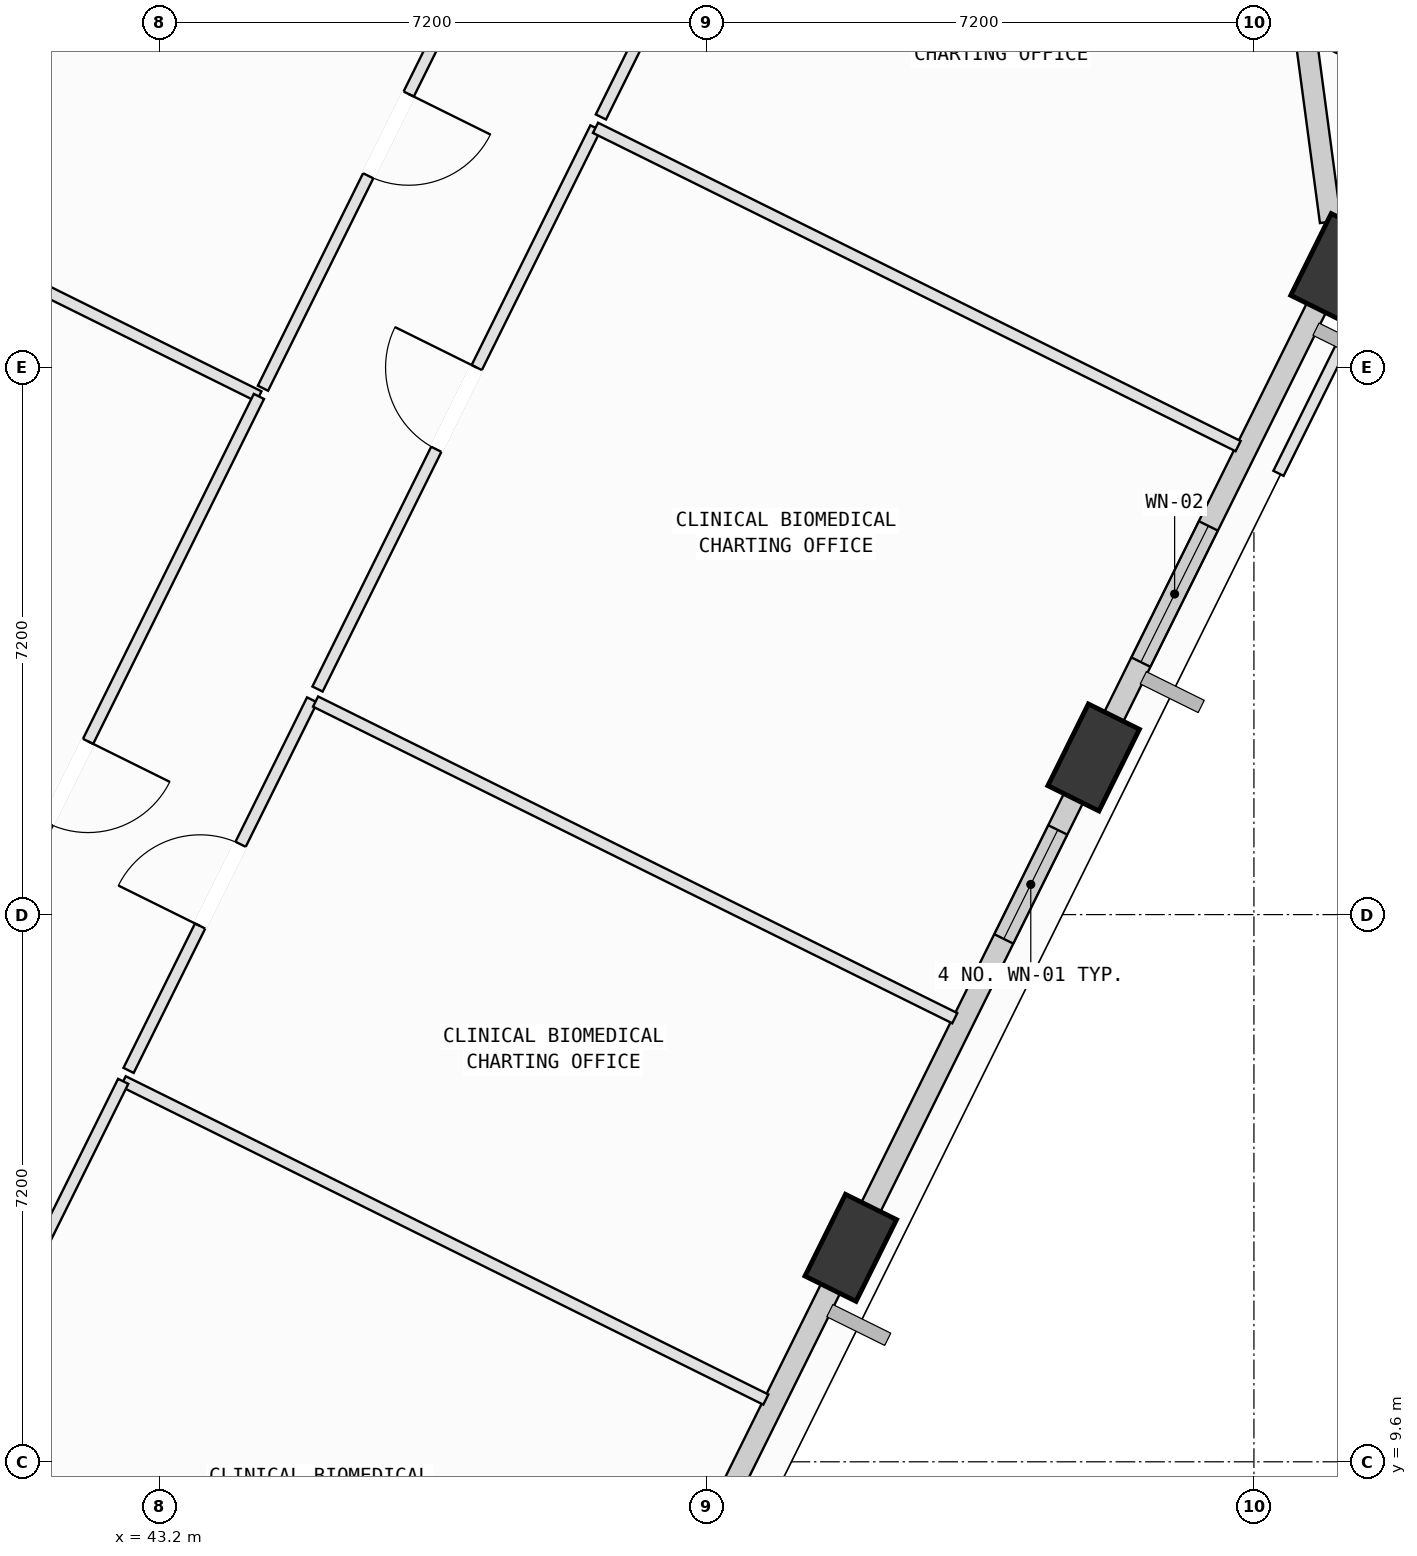
"""IFC4 building model, lengths in metres.
Left out: names, types, materials, properties, quantities, classifications, styles, units other than length and angle.
Written with IfcOpenShell. Run it as: python <this file> out.ifc"""

import sys

from ifc_helpers import new_model, si_unit, direction, frame, frame_2d, origin, origin_2d, place, context, subcontext, project, spatial, rectangle, extrude, element, fill, save


model = new_model("IFC4")
c1 = context("Model", 3, precision=1e-05, world=origin(), true_north=direction((0.0, 1.0)))
c2 = subcontext(c1, "Body", "Model", "MODEL_VIEW")
j1 = project(units=[si_unit("LENGTHUNIT", "METRE"), si_unit("PLANEANGLEUNIT", "RADIAN")], contexts=[c1])
p1 = place(None, origin())
s1 = spatial("IfcSite", under=j1, at=p1, CompositionType="ELEMENT")
p2 = place(p1, origin())
s2 = spatial("IfcBuilding", under=s1, at=p2, CompositionType="ELEMENT")
p3 = place(p2, frame((0.0, 0.0, 296.6)))
s3 = spatial("IfcBuildingStorey", under=s2, at=p3, CompositionType="ELEMENT", Elevation=296.6)
p4 = place(p3, frame((52.295, 12.415, 0.002), z_axis=(0.050487772737, 0.077617347004, 0.995704038481), x_axis=(-0.858579021169, -0.505922543013, 0.082972554979)))
e1 = element("IfcColumn", 1, at=p4, inside=s3, PredefinedType="COLUMN", context=c2, shape_type="SweptSolid", body=[
    extrude(rectangle(XDim=1.2, YDim=0.75, at=origin_2d()), origin(), (0.0, 0.0, 1.0), 4.014),
])
p5 = place(p3, frame((55.491, 18.867, 0.002), z_axis=(0.023720882044, 0.09056511119, 0.995607995343), x_axis=(-0.655420706242, -0.750590220305, 0.083892902038)))
e2 = element("IfcColumn", 2, at=p5, inside=s3, PredefinedType="COLUMN", context=c2, shape_type="SweptSolid", body=[
    extrude(rectangle(XDim=1.2, YDim=0.75, at=origin_2d()), origin(), (0.0, 0.0, 1.0), 4.014),
])
p6 = place(p3, frame((58.687, 25.319, 0.002), z_axis=(-0.003038161274, 0.103419009772, 0.994633237929), x_axis=(-0.417489626034, -0.903939479428, 0.092713697397)))
e3 = element("IfcColumn", 3, at=p6, inside=s3, PredefinedType="COLUMN", context=c2, shape_type="SweptSolid", body=[
    extrude(rectangle(XDim=1.2, YDim=0.75, at=origin_2d()), origin(), (0.0, 0.0, 1.0), 4.018),
])
p7 = place(p3, frame((52.201, 12.225, 0.0), z_axis=(0.0, 0.0, 1.0), x_axis=(-0.443860567831, -0.896095863357, 0.0)))
e4 = element("IfcWall", 4, at=p7, inside=s3, PredefinedType="SOLIDWALL", context=c2, shape_type="SweptSolid", body=[
    extrude(rectangle(XDim=6.414, YDim=0.28, at=frame_2d((3.207, 0.0))), origin(), (0.0, 0.0, 1.0), 3.265),
])
p8 = place(p7, frame((3.746, 0.0, 0.75)))
e5 = element("IfcOpeningElement", 5, at=p8, cuts=e4, PredefinedType="OPENING", context=c2, shape_type="SweptSolid", body=[
    extrude(rectangle(XDim=1.2, YDim=1.75, at=frame_2d((0.6, 0.875))), frame((0.0, 0.15, 0.0), z_axis=(0.0, -1.0, 0.0), x_axis=(1.0, 0.0, 0.0)), (0.0, 0.0, 1.0), 0.3),
])
p9 = place(p3, frame((55.397, 18.677, 0.0), z_axis=(0.0, 0.0, 1.0), x_axis=(-0.443826536777, -0.896112719055, 0.0)))
e6 = element("IfcWall", 6, at=p9, inside=s3, PredefinedType="SOLIDWALL", context=c2, shape_type="SweptSolid", body=[
    extrude(rectangle(XDim=6.407, YDim=0.28, at=frame_2d((3.203, 0.0))), origin(), (0.0, 0.0, 1.0), 3.265),
])
p10 = place(p9, frame((0.852, 0.0, 0.75)))
e7 = element("IfcOpeningElement", 7, at=p10, cuts=e6, PredefinedType="OPENING", context=c2, shape_type="SweptSolid", body=[
    extrude(rectangle(XDim=1.6, YDim=1.95, at=frame_2d((0.8, 0.975))), frame((0.0, 0.15, 0.0), z_axis=(0.0, -1.0, 0.0), x_axis=(1.0, 0.0, 0.0)), (0.0, 0.0, 1.0), 0.3),
])
p11 = place(p3, frame((58.597, 25.138, 0.0), z_axis=(0.0, 0.0, 1.0), x_axis=(-0.443863136941, -0.896094590802, 0.0)))
e8 = element("IfcWall", 8, at=p11, inside=s3, PredefinedType="SOLIDWALL", context=c2, shape_type="SweptSolid", body=[
    extrude(rectangle(XDim=6.418, YDim=0.28, at=frame_2d((3.209, 0.0))), origin(), (0.0, 0.0, 1.0), 3.265),
])
p12 = place(p11, frame((3.598, 0.0, 0.75)))
e9 = element("IfcOpeningElement", 9, at=p12, cuts=e8, PredefinedType="OPENING", context=c2, shape_type="SweptSolid", body=[
    extrude(rectangle(XDim=2.0, YDim=1.95, at=frame_2d((1.0, 0.975))), frame((0.0, 0.15, 0.0), z_axis=(0.0, -1.0, 0.0), x_axis=(1.0, 0.0, 0.0)), (0.0, 0.0, 1.0), 0.3),
])
p13 = place(p3, frame((57.907, 31.165, 0.0), z_axis=(0.0, 0.0, 1.0), x_axis=(0.132260381597, -0.991215007685, 0.0)))
e10 = element("IfcWall", 10, at=p13, inside=s3, PredefinedType="SOLIDWALL", context=c2, shape_type="SweptSolid", body=[
    extrude(rectangle(XDim=5.294, YDim=0.28, at=frame_2d((2.647, 0.0))), origin(), (0.0, 0.0, 1.0), 3.265),
])
p14 = place(p3, frame((42.723, 14.606, 0.0), z_axis=(0.0, 0.0, 1.0), x_axis=(0.896138758432, -0.443773957817, 0.0)))
e11 = element("IfcWall", 11, at=p14, inside=s3, PredefinedType="PARTITIONING", context=c2, shape_type="SweptSolid", body=[
    extrude(rectangle(XDim=9.435, YDim=0.15, at=frame_2d((4.718, 0.0))), origin(), (0.0, 0.0, 1.0), 3.78),
])
p15 = place(p3, frame((39.48, 8.058, 0.0), z_axis=(0.0, 0.0, 1.0), x_axis=(0.443815683985, 0.896118094142, 0.0)))
e12 = element("IfcWall", 12, at=p15, inside=s3, PredefinedType="PARTITIONING", context=c2, shape_type="SweptSolid", body=[
    extrude(rectangle(XDim=7.307, YDim=0.15, at=frame_2d((3.653, 0.0))), origin(), (0.0, 0.0, 1.0), 3.78),
])
p16 = place(p15, frame((3.053, 0.0, 0.0)))
e13 = element("IfcOpeningElement", 13, at=p16, cuts=e12, PredefinedType="OPENING", context=c2, shape_type="SweptSolid", body=[
    extrude(rectangle(XDim=1.2, YDim=2.15, at=frame_2d((0.6, 1.075))), frame((0.0, 0.085, 0.0), z_axis=(0.0, -1.0, 0.0), x_axis=(1.0, 0.0, 0.0)), (0.0, 0.0, 1.0), 0.17),
])
p17 = place(p3, frame((42.794, 14.75, 0.0), z_axis=(0.0, 0.0, 1.0), x_axis=(0.443907715055, 0.896072508514, 0.0)))
e14 = element("IfcWall", 14, at=p17, inside=s3, PredefinedType="PARTITIONING", context=c2, shape_type="SweptSolid", body=[
    extrude(rectangle(XDim=5.44, YDim=0.15, at=frame_2d((2.72, 0.0))), origin(), (0.0, 0.0, 1.0), 3.78),
])
p18 = place(p17, frame((2.12, 0.0, 0.0)))
e15 = element("IfcOpeningElement", 15, at=p18, cuts=e14, PredefinedType="OPENING", context=c2, shape_type="SweptSolid", body=[
    extrude(rectangle(XDim=1.2, YDim=2.15, at=frame_2d((0.6, 1.075))), frame((0.0, 0.085, 0.0), z_axis=(0.0, -1.0, 0.0), x_axis=(1.0, 0.0, 0.0)), (0.0, 0.0, 1.0), 0.17),
])
p19 = place(p3, frame((45.254, 19.603, 0.0), z_axis=(0.0, 0.0, 1.0), x_axis=(0.896085806874, -0.443880869963, 0.0)))
e16 = element("IfcWall", 16, at=p19, inside=s3, PredefinedType="PARTITIONING", context=c2, shape_type="SweptSolid", body=[
    extrude(rectangle(XDim=9.385, YDim=0.15, at=frame_2d((4.693, 0.0))), origin(), (0.0, 0.0, 1.0), 3.78),
])
p20 = place(p3, frame((52.76, 12.834, 0.0), z_axis=(0.0, 0.0, 1.0), x_axis=(-0.444751315026, -0.895654100522, 0.0)))
e17 = element("IfcWall", 17, at=p20, inside=s3, PredefinedType="PARTITIONING", context=c2, shape_type="SweptSolid", body=[
    extrude(rectangle(XDim=0.794, YDim=0.15, at=frame_2d((0.397, 0.0))), origin(), (0.0, 0.0, 1.0), 3.265),
])
p21 = place(p3, frame((45.28, 19.768, 0.0), z_axis=(0.0, 0.0, 1.0), x_axis=(0.443808981741, 0.896121413496, 0.0)))
e18 = element("IfcWall", 18, at=p21, inside=s3, PredefinedType="PARTITIONING", context=c2, shape_type="SweptSolid", body=[
    extrude(rectangle(XDim=8.24, YDim=0.15, at=frame_2d((4.12, 0.0))), origin(), (0.0, 0.0, 1.0), 3.415),
])
p22 = place(p21, frame((3.52, 0.0, 0.0)))
e19 = element("IfcOpeningElement", 19, at=p22, cuts=e18, PredefinedType="OPENING", context=c2, shape_type="SweptSolid", body=[
    extrude(rectangle(XDim=1.2, YDim=2.15, at=frame_2d((0.6, 1.075))), frame((0.0, 0.085, 0.0), z_axis=(0.0, -1.0, 0.0), x_axis=(1.0, 0.0, 0.0)), (0.0, 0.0, 1.0), 0.17),
])
p23 = place(p3, frame((48.937, 27.152, 0.0), z_axis=(0.0, 0.0, 1.0), x_axis=(0.896097594631, -0.4438570726, 0.0)))
e20 = element("IfcWall", 20, at=p23, inside=s3, PredefinedType="PARTITIONING", context=c2, shape_type="SweptSolid", body=[
    extrude(rectangle(XDim=9.436, YDim=0.15, at=frame_2d((4.718, 0.0))), origin(), (0.0, 0.0, 1.0), 3.78),
])
p24 = place(p3, frame((55.955, 19.285, 0.0), z_axis=(0.0, 0.0, 1.0), x_axis=(-0.444253567851, -0.895901092449, 0.0)))
e21 = element("IfcWall", 21, at=p24, inside=s3, PredefinedType="PARTITIONING", context=c2, shape_type="SweptSolid", body=[
    extrude(rectangle(XDim=0.792, YDim=0.15, at=frame_2d((0.396, 0.0))), origin(), (0.0, 0.0, 1.0), 3.265),
])
p25 = place(p3, frame((49.008, 27.295, 0.0), z_axis=(0.0, 0.0, 1.0), x_axis=(0.443907715055, 0.896072508514, 0.0)))
e22 = element("IfcWall", 22, at=p25, inside=s3, PredefinedType="PARTITIONING", context=c2, shape_type="SweptSolid", body=[
    extrude(rectangle(XDim=5.44, YDim=0.15, at=frame_2d((2.72, 0.0))), origin(), (0.0, 0.0, 1.0), 3.78),
])
p26 = place(p25, frame((2.12, 0.0, 0.0)))
e23 = element("IfcOpeningElement", 23, at=p26, cuts=e22, PredefinedType="OPENING", context=c2, shape_type="SweptSolid", body=[
    extrude(rectangle(XDim=1.2, YDim=2.15, at=frame_2d((0.6, 1.075))), frame((0.0, 0.085, 0.0), z_axis=(0.0, -1.0, 0.0), x_axis=(1.0, 0.0, 0.0)), (0.0, 0.0, 1.0), 0.17),
])
p27 = place(p3, frame((58.416, 28.356, 0.0), z_axis=(0.0, 0.0, 1.0), x_axis=(0.895897385058, -0.444261044259, 0.0)))
e24 = element("IfcWall", 24, at=p27, inside=s3, PredefinedType="PARTITIONING", context=c2, shape_type="SweptSolid", body=[
    extrude(rectangle(XDim=1.821, YDim=0.15, at=frame_2d((0.91, 0.0))), origin(), (0.0, 0.0, 1.0), 3.78),
])
p28 = place(p3, frame((36.592, 27.54, 0.0), z_axis=(0.0, 0.0, 1.0), x_axis=(0.89606802556, -0.443916764235, 0.0)))
e25 = element("IfcWall", 25, at=p28, inside=s3, PredefinedType="PARTITIONING", context=c2, shape_type="SweptSolid", body=[
    extrude(rectangle(XDim=8.835, YDim=0.15, at=frame_2d((4.417, 0.0))), origin(), (0.0, 0.0, 1.0), 3.78),
])
p29 = place(p3, frame((44.509, 23.618, 0.0), z_axis=(0.0, 0.0, 1.0), x_axis=(-0.443866227597, -0.896093059899, 0.0)))
e26 = element("IfcWall", 26, at=p29, inside=s3, PredefinedType="PARTITIONING", context=c2, shape_type="SweptSolid", body=[
    extrude(rectangle(XDim=11.33, YDim=0.15, at=frame_2d((5.665, 0.0))), origin(), (0.0, 0.0, 1.0), 3.78),
])
p30 = place(p29, frame((5.065, 0.0, 0.0)))
e27 = element("IfcOpeningElement", 27, at=p30, cuts=e26, PredefinedType="OPENING", context=c2, shape_type="SweptSolid", body=[
    extrude(rectangle(XDim=1.2, YDim=2.15, at=frame_2d((0.6, 1.075))), frame((0.0, 0.085, 0.0), z_axis=(0.0, -1.0, 0.0), x_axis=(1.0, 0.0, 0.0)), (0.0, 0.0, 1.0), 0.17),
])
p31 = place(p3, frame((47.864, 30.392, 0.0), z_axis=(0.0, 0.0, 1.0), x_axis=(-0.443876084137, -0.896088177543, 0.0)))
e28 = element("IfcWall", 28, at=p31, inside=s3, PredefinedType="PARTITIONING", context=c2, shape_type="SweptSolid", body=[
    extrude(rectangle(XDim=7.439, YDim=0.15, at=frame_2d((3.719, 0.0))), origin(), (0.0, 0.0, 1.0), 3.78),
])
p32 = place(p31, frame((3.119, 0.0, 0.0)))
e29 = element("IfcOpeningElement", 29, at=p32, cuts=e28, PredefinedType="OPENING", context=c2, shape_type="SweptSolid", body=[
    extrude(rectangle(XDim=1.2, YDim=2.15, at=frame_2d((0.6, 1.075))), frame((0.0, 0.085, 0.0), z_axis=(0.0, -1.0, 0.0), x_axis=(1.0, 0.0, 0.0)), (0.0, 0.0, 1.0), 0.17),
])
p33 = place(p3, frame((60.307, 27.418, 0.0), z_axis=(0.0, 0.0, 1.0), x_axis=(-0.443900826603, -0.896075920969, 0.0)))
e30 = element("IfcWall", 30, at=p33, inside=s3, PredefinedType="PARTITIONING", context=c2, shape_type="SweptSolid", body=[
    extrude(rectangle(XDim=5.37, YDim=0.15, at=frame_2d((2.685, 0.0))), origin(), (0.0, 0.0, 1.0), 3.78),
])
p34 = place(p10, origin())
e31 = element("IfcWindow", 31, at=p34, inside=s3, PartitioningType="SINGLE_PANEL", PredefinedType="WINDOW", context=c2, shape_type="SweptSolid", body=[
    extrude(rectangle(XDim=1.6, YDim=1.95, at=frame_2d((0.8, 0.975))), frame((0.0, 0.03, 0.0), z_axis=(0.0, -1.0, 0.0), x_axis=(1.0, 0.0, 0.0)), (0.0, 0.0, 1.0), 0.06),
])
fill(e7, e31)
p35 = place(p12, origin())
e32 = element("IfcWindow", 32, at=p35, inside=s3, PartitioningType="SINGLE_PANEL", PredefinedType="WINDOW", context=c2, shape_type="SweptSolid", body=[
    extrude(rectangle(XDim=2.0, YDim=1.95, at=frame_2d((1.0, 0.975))), frame((0.0, 0.03, 0.0), z_axis=(0.0, -1.0, 0.0), x_axis=(1.0, 0.0, 0.0)), (0.0, 0.0, 1.0), 0.06),
])
fill(e9, e32)
p36 = place(p18, origin())
e33 = element("IfcDoor", 33, at=p36, inside=s3, OperationType="SINGLE_SWING_LEFT", PredefinedType="DOOR", context=c2, shape_type="SweptSolid", body=[
    extrude(rectangle(XDim=1.2, YDim=2.15, at=frame_2d((0.6, 1.075))), frame((0.0, 0.025, 0.0), z_axis=(0.0, -1.0, 0.0), x_axis=(1.0, 0.0, 0.0)), (0.0, 0.0, 1.0), 0.05),
])
fill(e15, e33)
p37 = place(p22, origin())
e34 = element("IfcDoor", 34, at=p37, inside=s3, OperationType="SINGLE_SWING_RIGHT", PredefinedType="DOOR", context=c2, shape_type="SweptSolid", body=[
    extrude(rectangle(XDim=1.2, YDim=2.15, at=frame_2d((0.6, 1.075))), frame((0.0, 0.025, 0.0), z_axis=(0.0, -1.0, 0.0), x_axis=(1.0, 0.0, 0.0)), (0.0, 0.0, 1.0), 0.05),
])
fill(e19, e34)
p38 = place(p30, origin())
e35 = element("IfcDoor", 35, at=p38, inside=s3, OperationType="SINGLE_SWING_LEFT", PredefinedType="DOOR", context=c2, shape_type="SweptSolid", body=[
    extrude(rectangle(XDim=1.2, YDim=2.15, at=frame_2d((0.6, 1.075))), frame((0.0, 0.025, 0.0), z_axis=(0.0, -1.0, 0.0), x_axis=(1.0, 0.0, 0.0)), (0.0, 0.0, 1.0), 0.05),
])
fill(e27, e35)
p39 = place(p32, origin())
e36 = element("IfcDoor", 36, at=p39, inside=s3, OperationType="SINGLE_SWING_LEFT", PredefinedType="DOOR", context=c2, shape_type="SweptSolid", body=[
    extrude(rectangle(XDim=1.2, YDim=2.15, at=frame_2d((0.6, 1.075))), frame((0.0, 0.025, 0.0), z_axis=(0.0, -1.0, 0.0), x_axis=(1.0, 0.0, 0.0)), (0.0, 0.0, 1.0), 0.05),
])
fill(e29, e36)
save(model, sys.argv[1])
